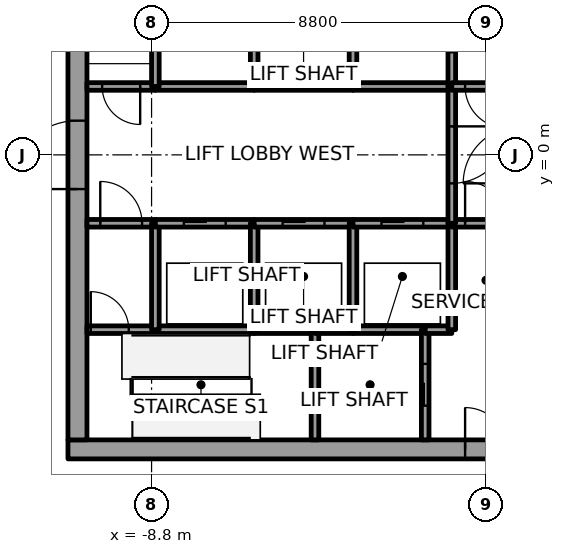
"""IFC4 building model, lengths in metres.
Left out: names, types, materials, properties, quantities, classifications, styles, units other than length and angle.
Written with IfcOpenShell. Run it as: python <this file> out.ifc"""

import sys

from ifc_helpers import new_model, si_unit, direction, frame, frame_2d, origin, place, context, subcontext, project, spatial, rectangle, extrude, element, fill, save


model = new_model("IFC4")
c1 = context("Model", 3, precision=1e-05, world=origin(), true_north=direction((0.0, 1.0)))
c2 = subcontext(c1, "Body", "Model", "MODEL_VIEW")
j1 = project(units=[si_unit("LENGTHUNIT", "METRE"), si_unit("PLANEANGLEUNIT", "RADIAN")], contexts=[c1])
p1 = place(None, origin())
s1 = spatial("IfcSite", under=j1, at=p1, CompositionType="ELEMENT")
p2 = place(p1, origin())
s2 = spatial("IfcBuilding", under=s1, at=p2, CompositionType="ELEMENT")
p3 = place(p2, frame((0.0, 0.0, 165.8)))
s3 = spatial("IfcBuildingStorey", under=s2, at=p3, CompositionType="ELEMENT", Elevation=165.8)
p4 = place(p3, frame((-11.0, -7.75, 0.0), z_axis=(0.0, 0.0, 1.0), x_axis=(1.0, 0.0, 0.0)))
e1 = element("IfcWall", 1, at=p4, inside=s3, PredefinedType="SHEAR", context=c2, shape_type="SweptSolid", body=[
    extrude(rectangle(XDim=22.0, YDim=0.5, at=frame_2d((11.0, 0.0))), origin(), (0.0, 0.0, 1.0), 4.0),
])
p5 = place(p4, frame((10.45, 0.0, 0.0)))
e2 = element("IfcOpeningElement", 2, at=p5, cuts=e1, PredefinedType="OPENING", context=c2, shape_type="SweptSolid", body=[
    extrude(rectangle(XDim=1.1, YDim=2.1, at=frame_2d((0.55, 1.05))), frame((0.0, 0.25, 0.0), z_axis=(0.0, -1.0, 0.0), x_axis=(1.0, 0.0, 0.0)), (0.0, 0.0, 1.0), 0.5),
])
p6 = place(p3, frame((-10.75, -7.5, 0.0), z_axis=(0.0, 0.0, 1.0), x_axis=(0.0, 1.0, 0.0)))
e3 = element("IfcWall", 3, at=p6, inside=s3, PredefinedType="SHEAR", context=c2, shape_type="SweptSolid", body=[
    extrude(rectangle(XDim=15.0, YDim=0.5, at=frame_2d((7.5, 0.0))), origin(), (0.0, 0.0, 1.0), 4.0),
])
p7 = place(p6, frame((6.6, 0.0, 0.0)))
e4 = element("IfcOpeningElement", 4, at=p7, cuts=e3, PredefinedType="OPENING", context=c2, shape_type="SweptSolid", body=[
    extrude(rectangle(XDim=1.8, YDim=2.1, at=frame_2d((0.9, 1.05))), frame((0.0, 0.25, 0.0), z_axis=(0.0, -1.0, 0.0), x_axis=(1.0, 0.0, 0.0)), (0.0, 0.0, 1.0), 0.5),
])
p8 = place(p3, frame((-10.5, -4.6, 0.0), z_axis=(0.0, 0.0, 1.0), x_axis=(1.0, 0.0, 0.0)))
e5 = element("IfcWall", 5, at=p8, inside=s3, PredefinedType="SOLIDWALL", context=c2, shape_type="SweptSolid", body=[
    extrude(rectangle(XDim=1.8, YDim=0.2, at=frame_2d((0.9, 0.0))), origin(), (0.0, 0.0, 1.0), 3.85),
])
p9 = place(p8, frame((0.1, 0.0, 0.0)))
e6 = element("IfcOpeningElement", 6, at=p9, cuts=e5, PredefinedType="OPENING", context=c2, shape_type="SweptSolid", body=[
    extrude(rectangle(XDim=1.0, YDim=2.1, at=frame_2d((0.5, 1.05))), frame((0.0, 0.1, 0.0), z_axis=(0.0, -1.0, 0.0), x_axis=(1.0, 0.0, 0.0)), (0.0, 0.0, 1.0), 0.2),
])
p10 = place(p3, frame((-10.5, -1.8, 0.0), z_axis=(0.0, 0.0, 1.0), x_axis=(1.0, 0.0, 0.0)))
e7 = element("IfcWall", 7, at=p10, inside=s3, PredefinedType="SOLIDWALL", context=c2, shape_type="SweptSolid", body=[
    extrude(rectangle(XDim=1.8, YDim=0.2, at=frame_2d((0.9, 0.0))), origin(), (0.0, 0.0, 1.0), 3.85),
])
p11 = place(p10, frame((0.35, 0.0, 0.0)))
e8 = element("IfcOpeningElement", 8, at=p11, cuts=e7, PredefinedType="OPENING", context=c2, shape_type="SweptSolid", body=[
    extrude(rectangle(XDim=1.1, YDim=2.1, at=frame_2d((0.55, 1.05))), frame((0.0, 0.1, 0.0), z_axis=(0.0, -1.0, 0.0), x_axis=(1.0, 0.0, 0.0)), (0.0, 0.0, 1.0), 0.2),
])
p12 = place(p3, frame((-8.7, 1.8, 0.0), z_axis=(0.0, 0.0, 1.0), x_axis=(-1.0, 0.0, 0.0)))
e9 = element("IfcWall", 9, at=p12, inside=s3, PredefinedType="SOLIDWALL", context=c2, shape_type="SweptSolid", body=[
    extrude(rectangle(XDim=1.8, YDim=0.2, at=frame_2d((0.9, 0.0))), origin(), (0.0, 0.0, 1.0), 3.85),
])
p13 = place(p12, frame((0.4, 0.0, 0.0)))
e10 = element("IfcOpeningElement", 10, at=p13, cuts=e9, PredefinedType="OPENING", context=c2, shape_type="SweptSolid", body=[
    extrude(rectangle(XDim=1.0, YDim=2.1, at=frame_2d((0.5, 1.05))), frame((0.0, 0.1, 0.0), z_axis=(0.0, -1.0, 0.0), x_axis=(1.0, 0.0, 0.0)), (0.0, 0.0, 1.0), 0.2),
])
p14 = place(p3, frame((-8.7, -4.6, 0.0), z_axis=(0.0, 0.0, 1.0), x_axis=(1.0, 0.0, 0.0)))
e11 = element("IfcWall", 11, at=p14, inside=s3, PredefinedType="SOLIDWALL", context=c2, shape_type="SweptSolid", body=[
    extrude(rectangle(XDim=2.6, YDim=0.2, at=frame_2d((1.3, 0.0))), origin(), (0.0, 0.0, 1.0), 3.85),
])
p15 = place(p3, frame((-8.7, -4.6, 0.0), z_axis=(0.0, 0.0, 1.0), x_axis=(0.0, 1.0, 0.0)))
e12 = element("IfcWall", 12, at=p15, inside=s3, PredefinedType="SOLIDWALL", context=c2, shape_type="SweptSolid", body=[
    extrude(rectangle(XDim=2.8, YDim=0.2, at=frame_2d((1.4, 0.0))), origin(), (0.0, 0.0, 1.0), 3.85),
])
p16 = place(p3, frame((-8.7, -1.8, 0.0), z_axis=(0.0, 0.0, 1.0), x_axis=(1.0, 0.0, 0.0)))
e13 = element("IfcWall", 13, at=p16, inside=s3, PredefinedType="SOLIDWALL", context=c2, shape_type="SweptSolid", body=[
    extrude(rectangle(XDim=2.6, YDim=0.2, at=frame_2d((1.3, 0.0))), origin(), (0.0, 0.0, 1.0), 3.85),
])
p17 = place(p16, frame((0.75, 0.0, 0.0)))
e14 = element("IfcOpeningElement", 14, at=p17, cuts=e13, PredefinedType="OPENING", context=c2, shape_type="SweptSolid", body=[
    extrude(rectangle(XDim=1.1, YDim=2.1, at=frame_2d((0.55, 1.05))), frame((0.0, 0.1, 0.0), z_axis=(0.0, -1.0, 0.0), x_axis=(1.0, 0.0, 0.0)), (0.0, 0.0, 1.0), 0.2),
])
p18 = place(p3, frame((-6.1, 1.8, 0.0), z_axis=(0.0, 0.0, 1.0), x_axis=(-1.0, 0.0, 0.0)))
e15 = element("IfcWall", 15, at=p18, inside=s3, PredefinedType="SOLIDWALL", context=c2, shape_type="SweptSolid", body=[
    extrude(rectangle(XDim=2.6, YDim=0.2, at=frame_2d((1.3, 0.0))), origin(), (0.0, 0.0, 1.0), 3.85),
])
p19 = place(p3, frame((-8.7, 1.8, 0.0), z_axis=(0.0, 0.0, 1.0), x_axis=(0.0, 1.0, 0.0)))
e16 = element("IfcWall", 16, at=p19, inside=s3, PredefinedType="SOLIDWALL", context=c2, shape_type="SweptSolid", body=[
    extrude(rectangle(XDim=2.8, YDim=0.2, at=frame_2d((1.4, 0.0))), origin(), (0.0, 0.0, 1.0), 3.85),
])
p20 = place(p3, frame((-6.1, -4.6, 0.0), z_axis=(0.0, 0.0, 1.0), x_axis=(1.0, 0.0, 0.0)))
e17 = element("IfcWall", 17, at=p20, inside=s3, PredefinedType="SOLIDWALL", context=c2, shape_type="SweptSolid", body=[
    extrude(rectangle(XDim=1.6, YDim=0.2, at=frame_2d((0.8, 0.0))), origin(), (0.0, 0.0, 1.0), 3.85),
])
p21 = place(p3, frame((-6.1, -4.6, 0.0), z_axis=(0.0, 0.0, 1.0), x_axis=(0.0, 1.0, 0.0)))
e18 = element("IfcWall", 18, at=p21, inside=s3, PredefinedType="SOLIDWALL", context=c2, shape_type="SweptSolid", body=[
    extrude(rectangle(XDim=2.8, YDim=0.2, at=frame_2d((1.4, 0.0))), origin(), (0.0, 0.0, 1.0), 3.85),
])
p22 = place(p3, frame((-6.1, -1.8, 0.0), z_axis=(0.0, 0.0, 1.0), x_axis=(1.0, 0.0, 0.0)))
e19 = element("IfcWall", 19, at=p22, inside=s3, PredefinedType="SOLIDWALL", context=c2, shape_type="SweptSolid", body=[
    extrude(rectangle(XDim=2.6, YDim=0.2, at=frame_2d((1.3, 0.0))), origin(), (0.0, 0.0, 1.0), 3.85),
])
p23 = place(p22, frame((0.75, 0.0, 0.0)))
e20 = element("IfcOpeningElement", 20, at=p23, cuts=e19, PredefinedType="OPENING", context=c2, shape_type="SweptSolid", body=[
    extrude(rectangle(XDim=1.1, YDim=2.1, at=frame_2d((0.55, 1.05))), frame((0.0, 0.1, 0.0), z_axis=(0.0, -1.0, 0.0), x_axis=(1.0, 0.0, 0.0)), (0.0, 0.0, 1.0), 0.2),
])
p24 = place(p3, frame((-3.5, 1.8, 0.0), z_axis=(0.0, 0.0, 1.0), x_axis=(-1.0, 0.0, 0.0)))
e21 = element("IfcWall", 21, at=p24, inside=s3, PredefinedType="SOLIDWALL", context=c2, shape_type="SweptSolid", body=[
    extrude(rectangle(XDim=2.6, YDim=0.2, at=frame_2d((1.3, 0.0))), origin(), (0.0, 0.0, 1.0), 3.85),
])
p25 = place(p3, frame((-6.1, 1.8, 0.0), z_axis=(0.0, 0.0, 1.0), x_axis=(0.0, 1.0, 0.0)))
e22 = element("IfcWall", 22, at=p25, inside=s3, PredefinedType="SOLIDWALL", context=c2, shape_type="SweptSolid", body=[
    extrude(rectangle(XDim=2.8, YDim=0.2, at=frame_2d((1.4, 0.0))), origin(), (0.0, 0.0, 1.0), 3.85),
])
p26 = place(p3, frame((-4.5, -4.6, 0.0), z_axis=(0.0, 0.0, 1.0), x_axis=(0.0, -1.0, 0.0)))
e23 = element("IfcWall", 23, at=p26, inside=s3, PredefinedType="SOLIDWALL", context=c2, shape_type="SweptSolid", body=[
    extrude(rectangle(XDim=2.9, YDim=0.2, at=frame_2d((1.45, 0.0))), origin(), (0.0, 0.0, 1.0), 3.85),
])
p27 = place(p3, frame((-4.5, -4.6, 0.0), z_axis=(0.0, 0.0, 1.0), x_axis=(1.0, 0.0, 0.0)))
e24 = element("IfcWall", 24, at=p27, inside=s3, PredefinedType="SOLIDWALL", context=c2, shape_type="SweptSolid", body=[
    extrude(rectangle(XDim=1.0, YDim=0.2, at=frame_2d((0.5, 0.0))), origin(), (0.0, 0.0, 1.0), 3.85),
])
p28 = place(p3, frame((-3.5, -4.6, 0.0), z_axis=(0.0, 0.0, 1.0), x_axis=(1.0, 0.0, 0.0)))
e25 = element("IfcWall", 25, at=p28, inside=s3, PredefinedType="SOLIDWALL", context=c2, shape_type="SweptSolid", body=[
    extrude(rectangle(XDim=1.9, YDim=0.2, at=frame_2d((0.95, 0.0))), origin(), (0.0, 0.0, 1.0), 3.85),
])
p29 = place(p3, frame((-3.5, -4.6, 0.0), z_axis=(0.0, 0.0, 1.0), x_axis=(0.0, 1.0, 0.0)))
e26 = element("IfcWall", 26, at=p29, inside=s3, PredefinedType="SOLIDWALL", context=c2, shape_type="SweptSolid", body=[
    extrude(rectangle(XDim=2.8, YDim=0.2, at=frame_2d((1.4, 0.0))), origin(), (0.0, 0.0, 1.0), 3.85),
])
p30 = place(p3, frame((-3.5, -1.8, 0.0), z_axis=(0.0, 0.0, 1.0), x_axis=(1.0, 0.0, 0.0)))
e27 = element("IfcWall", 27, at=p30, inside=s3, PredefinedType="SOLIDWALL", context=c2, shape_type="SweptSolid", body=[
    extrude(rectangle(XDim=2.6, YDim=0.2, at=frame_2d((1.3, 0.0))), origin(), (0.0, 0.0, 1.0), 3.85),
])
p31 = place(p30, frame((0.75, 0.0, 0.0)))
e28 = element("IfcOpeningElement", 28, at=p31, cuts=e27, PredefinedType="OPENING", context=c2, shape_type="SweptSolid", body=[
    extrude(rectangle(XDim=1.1, YDim=2.1, at=frame_2d((0.55, 1.05))), frame((0.0, 0.1, 0.0), z_axis=(0.0, -1.0, 0.0), x_axis=(1.0, 0.0, 0.0)), (0.0, 0.0, 1.0), 0.2),
])
p32 = place(p3, frame((-0.9, 1.8, 0.0), z_axis=(0.0, 0.0, 1.0), x_axis=(-1.0, 0.0, 0.0)))
e29 = element("IfcWall", 29, at=p32, inside=s3, PredefinedType="SOLIDWALL", context=c2, shape_type="SweptSolid", body=[
    extrude(rectangle(XDim=2.6, YDim=0.2, at=frame_2d((1.3, 0.0))), origin(), (0.0, 0.0, 1.0), 3.85),
])
p33 = place(p3, frame((-3.5, 4.6, 0.0), z_axis=(0.0, 0.0, 1.0), x_axis=(0.0, -1.0, 0.0)))
e30 = element("IfcWall", 30, at=p33, inside=s3, PredefinedType="SOLIDWALL", context=c2, shape_type="SweptSolid", body=[
    extrude(rectangle(XDim=2.8, YDim=0.2, at=frame_2d((1.4, 0.0))), origin(), (0.0, 0.0, 1.0), 3.85),
])
p34 = place(p3, frame((-0.9, 1.8, 0.0), z_axis=(0.0, 0.0, 1.0), x_axis=(0.0, 1.0, 0.0)))
e31 = element("IfcWall", 31, at=p34, inside=s3, PredefinedType="SOLIDWALL", context=c2, shape_type="SweptSolid", body=[
    extrude(rectangle(XDim=3.0, YDim=0.2, at=frame_2d((1.5, 0.0))), origin(), (0.0, 0.0, 1.0), 3.85),
])
p35 = place(p34, frame((0.9, 0.0, 0.0)))
e32 = element("IfcOpeningElement", 32, at=p35, cuts=e31, PredefinedType="OPENING", context=c2, shape_type="SweptSolid", body=[
    extrude(rectangle(XDim=1.2, YDim=2.1, at=frame_2d((0.6, 1.05))), frame((0.0, 0.1, 0.0), z_axis=(0.0, -1.0, 0.0), x_axis=(1.0, 0.0, 0.0)), (0.0, 0.0, 1.0), 0.2),
])
p36 = place(p3, frame((-1.6, -7.5, 0.0), z_axis=(0.0, 0.0, 1.0), x_axis=(0.0, 1.0, 0.0)))
e33 = element("IfcWall", 33, at=p36, inside=s3, PredefinedType="SOLIDWALL", context=c2, shape_type="SweptSolid", body=[
    extrude(rectangle(XDim=2.9, YDim=0.2, at=frame_2d((1.45, 0.0))), origin(), (0.0, 0.0, 1.0), 3.85),
])
p37 = place(p36, frame((0.9, 0.0, 0.0)))
e34 = element("IfcOpeningElement", 34, at=p37, cuts=e33, PredefinedType="OPENING", context=c2, shape_type="SweptSolid", body=[
    extrude(rectangle(XDim=1.1, YDim=2.1, at=frame_2d((0.55, 1.05))), frame((0.0, 0.1, 0.0), z_axis=(0.0, -1.0, 0.0), x_axis=(1.0, 0.0, 0.0)), (0.0, 0.0, 1.0), 0.2),
])
p38 = place(p3, frame((-1.6, -4.6, 0.0), z_axis=(0.0, 0.0, 1.0), x_axis=(1.0, 0.0, 0.0)))
e35 = element("IfcWall", 35, at=p38, inside=s3, PredefinedType="SOLIDWALL", context=c2, shape_type="SweptSolid", body=[
    extrude(rectangle(XDim=0.7, YDim=0.2, at=frame_2d((0.35, 0.0))), origin(), (0.0, 0.0, 1.0), 3.85),
])
p39 = place(p3, frame((-0.9, -4.6, 0.0), z_axis=(0.0, 0.0, 1.0), x_axis=(0.0, 1.0, 0.0)))
e36 = element("IfcWall", 36, at=p39, inside=s3, PredefinedType="SOLIDWALL", context=c2, shape_type="SweptSolid", body=[
    extrude(rectangle(XDim=2.8, YDim=0.2, at=frame_2d((1.4, 0.0))), origin(), (0.0, 0.0, 1.0), 3.85),
])
p40 = place(p3, frame((-0.9, -1.8, 0.0), z_axis=(0.0, 0.0, 1.0), x_axis=(1.0, 0.0, 0.0)))
e37 = element("IfcWall", 37, at=p40, inside=s3, PredefinedType="SOLIDWALL", context=c2, shape_type="SweptSolid", body=[
    extrude(rectangle(XDim=1.8, YDim=0.2, at=frame_2d((0.9, 0.0))), origin(), (0.0, 0.0, 1.0), 3.85),
])
p41 = place(p40, frame((0.35, 0.0, 0.0)))
e38 = element("IfcOpeningElement", 38, at=p41, cuts=e37, PredefinedType="OPENING", context=c2, shape_type="SweptSolid", body=[
    extrude(rectangle(XDim=1.1, YDim=2.1, at=frame_2d((0.55, 1.05))), frame((0.0, 0.1, 0.0), z_axis=(0.0, -1.0, 0.0), x_axis=(1.0, 0.0, 0.0)), (0.0, 0.0, 1.0), 0.2),
])
p42 = place(p3, frame((-0.9, 1.8, 0.0), z_axis=(0.0, 0.0, 1.0), x_axis=(0.0, -1.0, 0.0)))
e39 = element("IfcWall", 39, at=p42, inside=s3, PredefinedType="SOLIDWALL", context=c2, shape_type="SweptSolid", body=[
    extrude(rectangle(XDim=3.6, YDim=0.2, at=frame_2d((1.8, 0.0))), origin(), (0.0, 0.0, 1.0), 3.85),
])
p43 = place(p42, frame((1.05, 0.0, 0.0)))
e40 = element("IfcOpeningElement", 40, at=p43, cuts=e39, PredefinedType="OPENING", context=c2, shape_type="SweptSolid", body=[
    extrude(rectangle(XDim=1.5, YDim=2.1, at=frame_2d((0.75, 1.05))), frame((0.0, 0.1, 0.0), z_axis=(0.0, -1.0, 0.0), x_axis=(1.0, 0.0, 0.0)), (0.0, 0.0, 1.0), 0.2),
])
p44 = place(p3, frame((0.9, 1.8, 0.0), z_axis=(0.0, 0.0, 1.0), x_axis=(-1.0, 0.0, 0.0)))
e41 = element("IfcWall", 41, at=p44, inside=s3, PredefinedType="SOLIDWALL", context=c2, shape_type="SweptSolid", body=[
    extrude(rectangle(XDim=1.8, YDim=0.2, at=frame_2d((0.9, 0.0))), origin(), (0.0, 0.0, 1.0), 3.85),
])
p45 = place(p44, frame((0.35, 0.0, 0.0)))
e42 = element("IfcOpeningElement", 42, at=p45, cuts=e41, PredefinedType="OPENING", context=c2, shape_type="SweptSolid", body=[
    extrude(rectangle(XDim=1.1, YDim=2.1, at=frame_2d((0.55, 1.05))), frame((0.0, 0.1, 0.0), z_axis=(0.0, -1.0, 0.0), x_axis=(1.0, 0.0, 0.0)), (0.0, 0.0, 1.0), 0.2),
])
p46 = place(p17, origin())
e43 = element("IfcDoor", 43, at=p46, inside=s3, OperationType="SLIDING_TO_LEFT", PredefinedType="DOOR", context=c2, shape_type="SweptSolid", body=[
    extrude(rectangle(XDim=1.1, YDim=2.1, at=frame_2d((0.55, 1.05))), frame((0.0, 0.025, 0.0), z_axis=(0.0, -1.0, 0.0), x_axis=(1.0, 0.0, 0.0)), (0.0, 0.0, 1.0), 0.05),
])
fill(e14, e43)
p47 = place(p23, origin())
e44 = element("IfcDoor", 44, at=p47, inside=s3, OperationType="SLIDING_TO_RIGHT", PredefinedType="DOOR", context=c2, shape_type="SweptSolid", body=[
    extrude(rectangle(XDim=1.1, YDim=2.1, at=frame_2d((0.55, 1.05))), frame((0.0, 0.025, 0.0), z_axis=(0.0, -1.0, 0.0), x_axis=(1.0, 0.0, 0.0)), (0.0, 0.0, 1.0), 0.05),
])
fill(e20, e44)
p48 = place(p31, origin())
e45 = element("IfcDoor", 45, at=p48, inside=s3, OperationType="SLIDING_TO_RIGHT", PredefinedType="DOOR", context=c2, shape_type="SweptSolid", body=[
    extrude(rectangle(XDim=1.1, YDim=2.1, at=frame_2d((0.55, 1.05))), frame((0.0, 0.025, 0.0), z_axis=(0.0, -1.0, 0.0), x_axis=(1.0, 0.0, 0.0)), (0.0, 0.0, 1.0), 0.05),
])
fill(e28, e45)
p49 = place(p37, origin())
e46 = element("IfcDoor", 46, at=p49, inside=s3, OperationType="SLIDING_TO_LEFT", PredefinedType="DOOR", context=c2, shape_type="SweptSolid", body=[
    extrude(rectangle(XDim=1.1, YDim=2.1, at=frame_2d((0.55, 1.05))), frame((0.0, 0.025, 0.0), z_axis=(0.0, -1.0, 0.0), x_axis=(1.0, 0.0, 0.0)), (0.0, 0.0, 1.0), 0.05),
])
fill(e34, e46)
p50 = place(p43, origin())
e47 = element("IfcDoor", 47, at=p50, inside=s3, OperationType="DOUBLE_DOOR_SINGLE_SWING", PredefinedType="DOOR", context=c2, shape_type="SweptSolid", body=[
    extrude(rectangle(XDim=1.5, YDim=2.1, at=frame_2d((0.75, 1.05))), frame((0.0, 0.025, 0.0), z_axis=(0.0, -1.0, 0.0), x_axis=(1.0, 0.0, 0.0)), (0.0, 0.0, 1.0), 0.05),
])
fill(e40, e47)
p51 = place(p11, origin())
e48 = element("IfcDoor", 48, at=p51, inside=s3, OperationType="SINGLE_SWING_RIGHT", PredefinedType="DOOR", context=c2, shape_type="SweptSolid", body=[
    extrude(rectangle(XDim=1.1, YDim=2.1, at=frame_2d((0.55, 1.05))), frame((0.0, 0.025, 0.0), z_axis=(0.0, -1.0, 0.0), x_axis=(1.0, 0.0, 0.0)), (0.0, 0.0, 1.0), 0.05),
])
fill(e8, e48)
p52 = place(p45, origin())
e49 = element("IfcDoor", 49, at=p52, inside=s3, OperationType="SINGLE_SWING_RIGHT", PredefinedType="DOOR", context=c2, shape_type="SweptSolid", body=[
    extrude(rectangle(XDim=1.1, YDim=2.1, at=frame_2d((0.55, 1.05))), frame((0.0, 0.025, 0.0), z_axis=(0.0, -1.0, 0.0), x_axis=(1.0, 0.0, 0.0)), (0.0, 0.0, 1.0), 0.05),
])
fill(e42, e49)
p53 = place(p41, origin())
e50 = element("IfcDoor", 50, at=p53, inside=s3, OperationType="SINGLE_SWING_RIGHT", PredefinedType="DOOR", context=c2, shape_type="SweptSolid", body=[
    extrude(rectangle(XDim=1.1, YDim=2.1, at=frame_2d((0.55, 1.05))), frame((0.0, 0.025, 0.0), z_axis=(0.0, -1.0, 0.0), x_axis=(1.0, 0.0, 0.0)), (0.0, 0.0, 1.0), 0.05),
])
fill(e38, e50)
p54 = place(p13, origin())
e51 = element("IfcDoor", 51, at=p54, inside=s3, OperationType="SINGLE_SWING_RIGHT", PredefinedType="DOOR", context=c2, shape_type="SweptSolid", body=[
    extrude(rectangle(XDim=1.0, YDim=2.1, at=frame_2d((0.5, 1.05))), frame((0.0, 0.025, 0.0), z_axis=(0.0, -1.0, 0.0), x_axis=(1.0, 0.0, 0.0)), (0.0, 0.0, 1.0), 0.05),
])
fill(e10, e51)
p55 = place(p9, origin())
e52 = element("IfcDoor", 52, at=p55, inside=s3, OperationType="SINGLE_SWING_LEFT", PredefinedType="DOOR", context=c2, shape_type="SweptSolid", body=[
    extrude(rectangle(XDim=1.0, YDim=2.1, at=frame_2d((0.5, 1.05))), frame((0.0, 0.025, 0.0), z_axis=(0.0, -1.0, 0.0), x_axis=(1.0, 0.0, 0.0)), (0.0, 0.0, 1.0), 0.05),
])
fill(e6, e52)
p56 = place(p7, origin())
e53 = element("IfcDoor", 53, at=p56, inside=s3, OperationType="DOUBLE_DOOR_SINGLE_SWING", PredefinedType="DOOR", context=c2, shape_type="SweptSolid", body=[
    extrude(rectangle(XDim=1.8, YDim=2.1, at=frame_2d((0.9, 1.05))), frame((0.0, 0.025, 0.0), z_axis=(0.0, -1.0, 0.0), x_axis=(1.0, 0.0, 0.0)), (0.0, 0.0, 1.0), 0.05),
])
fill(e4, e53)
p57 = place(p5, origin())
e54 = element("IfcDoor", 54, at=p57, inside=s3, OperationType="SINGLE_SWING_RIGHT", PredefinedType="DOOR", context=c2, shape_type="SweptSolid", body=[
    extrude(rectangle(XDim=1.1, YDim=2.1, at=frame_2d((0.55, 1.05))), frame((0.0, 0.025, 0.0), z_axis=(0.0, -1.0, 0.0), x_axis=(1.0, 0.0, 0.0)), (0.0, 0.0, 1.0), 0.05),
])
fill(e2, e54)
save(model, sys.argv[1])
